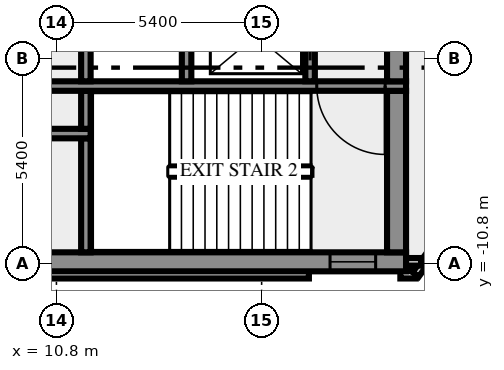
"""IFC4 building model, lengths in metres.
Left out: names, types, materials, properties, quantities, classifications, styles, units other than length and angle.
Written with IfcOpenShell. Run it as: python <this file> out.ifc"""

import sys

from ifc_helpers import new_model, si_unit, direction, frame, frame_2d, origin, place, context, subcontext, project, spatial, rectangle, extrude, element, fill, save


model = new_model("IFC4")
c1 = context("Model", 3, precision=1e-05, world=origin(), true_north=direction((0.0, 1.0)))
c2 = subcontext(c1, "Body", "Model", "MODEL_VIEW")
j1 = project(units=[si_unit("LENGTHUNIT", "METRE"), si_unit("PLANEANGLEUNIT", "RADIAN")], contexts=[c1])
p1 = place(None, origin())
s1 = spatial("IfcSite", under=j1, at=p1, CompositionType="ELEMENT")
p2 = place(p1, origin())
s2 = spatial("IfcBuilding", under=s1, at=p2, CompositionType="ELEMENT")
p3 = place(p2, frame((0.0, 0.0, 335.0)))
s3 = spatial("IfcBuildingStorey", under=s2, at=p3, CompositionType="ELEMENT", Elevation=335.0)
p4 = place(p3, frame((-17.444, -11.088, 0.0), z_axis=(0.0, 0.0, 1.0), x_axis=(1.0, 0.0, 0.0)))
e1 = element("IfcWall", 1, at=p4, inside=s3, PredefinedType="SOLIDWALL", context=c2, shape_type="SweptSolid", body=[
    extrude(rectangle(XDim=34.888, YDim=0.2, at=frame_2d((17.444, 0.0))), origin(), (0.0, 0.0, 1.0), 3.65),
])
p5 = place(p3, frame((19.85, -11.088, 0.0), z_axis=(0.0, 0.0, 1.0), x_axis=(1.0, 0.0, 0.0)))
e2 = element("IfcWall", 2, at=p5, inside=s3, PredefinedType="SOLIDWALL", context=c2, shape_type="SweptSolid", body=[
    extrude(rectangle(XDim=0.406, YDim=0.2, at=frame_2d((0.203, 0.0))), origin(), (0.0, 0.0, 1.0), 3.65),
])
p6 = place(p3, frame((20.253, -11.083, 0.0), z_axis=(0.0, 0.0, 1.0), x_axis=(0.587766567315, 0.809030569476, 0.0)))
e3 = element("IfcWall", 3, at=p6, inside=s3, PredefinedType="SOLIDWALL", context=c2, shape_type="SweptSolid", body=[
    extrude(rectangle(XDim=2.688, YDim=0.2, at=frame_2d((1.344, 0.0))), origin(), (0.0, 0.0, 1.0), 3.65),
])
p7 = place(p3, frame((19.98, -10.75, 0.0), z_axis=(0.0, 0.0, 1.0), x_axis=(1.0, 0.0, 0.0)))
e4 = element("IfcWall", 4, at=p7, inside=s3, PredefinedType="SOLIDWALL", context=c2, shape_type="SweptSolid", body=[
    extrude(rectangle(XDim=0.417, YDim=0.2, at=frame_2d((0.208, 0.0))), origin(), (0.0, 0.0, 1.0), 3.65),
])
p8 = place(p3, frame((-20.0, -10.75, 0.0), z_axis=(0.0, 0.0, 1.0), x_axis=(1.0, 0.0, 0.0)))
e5 = element("IfcWall", 5, at=p8, inside=s3, PredefinedType="SHEAR", context=c2, shape_type="SweptSolid", body=[
    extrude(rectangle(XDim=40.0, YDim=0.5, at=frame_2d((20.0, 0.0))), origin(), (0.0, 0.0, 1.0), 3.65),
])
p9 = place(p8, frame((0.8, 0.0, 1.0)))
e6 = element("IfcOpeningElement", 6, at=p9, cuts=e5, PredefinedType="OPENING", context=c2, shape_type="SweptSolid", body=[
    extrude(rectangle(XDim=1.2, YDim=1.2, at=frame_2d((0.6, 0.6))), frame((0.0, 0.26, 0.0), z_axis=(0.0, -1.0, 0.0), x_axis=(1.0, 0.0, 0.0)), (0.0, 0.0, 1.0), 0.52),
])
p10 = place(p8, frame((38.0, 0.0, 1.0)))
e7 = element("IfcOpeningElement", 7, at=p10, cuts=e5, PredefinedType="OPENING", context=c2, shape_type="SweptSolid", body=[
    extrude(rectangle(XDim=1.2, YDim=1.2, at=frame_2d((0.6, 0.6))), frame((0.0, 0.26, 0.0), z_axis=(0.0, -1.0, 0.0), x_axis=(1.0, 0.0, 0.0)), (0.0, 0.0, 1.0), 0.52),
])
p11 = place(p3, frame((11.575, -10.5, 0.0), z_axis=(0.0, 0.0, 1.0), x_axis=(0.0, 1.0, 0.0)))
e8 = element("IfcWall", 8, at=p11, inside=s3, PredefinedType="SHEAR", context=c2, shape_type="SweptSolid", body=[
    extrude(rectangle(XDim=3.0, YDim=0.25, at=frame_2d((1.5, 0.0))), origin(), (0.0, 0.0, 1.0), 3.65),
])
p12 = place(p3, frame((19.75, -10.5, 0.0), z_axis=(0.0, 0.0, 1.0), x_axis=(0.0, 1.0, 0.0)))
e9 = element("IfcWall", 9, at=p12, inside=s3, PredefinedType="SHEAR", context=c2, shape_type="SweptSolid", body=[
    extrude(rectangle(XDim=4.25, YDim=0.5, at=frame_2d((2.125, 0.0))), origin(), (0.0, 0.0, 1.0), 3.65),
])
p13 = place(p3, frame((11.7, -7.375, 0.0), z_axis=(0.0, 0.0, 1.0), x_axis=(-1.0, 0.0, 0.0)))
e10 = element("IfcWall", 10, at=p13, inside=s3, PredefinedType="SHEAR", context=c2, shape_type="SweptSolid", body=[
    extrude(rectangle(XDim=23.4, YDim=0.25, at=frame_2d((11.7, 0.0))), origin(), (0.0, 0.0, 1.0), 3.65),
])
p14 = place(p13, frame((22.225, 0.0, 0.0)))
e11 = element("IfcOpeningElement", 11, at=p14, cuts=e10, PredefinedType="OPENING", context=c2, shape_type="SweptSolid", body=[
    extrude(rectangle(XDim=0.8, YDim=2.1, at=frame_2d((0.4, 1.05))), frame((0.0, 0.135, 0.0), z_axis=(0.0, -1.0, 0.0), x_axis=(1.0, 0.0, 0.0)), (0.0, 0.0, 1.0), 0.27),
])
p15 = place(p13, frame((20.2, 0.0, 0.0)))
e12 = element("IfcOpeningElement", 12, at=p15, cuts=e10, PredefinedType="OPENING", context=c2, shape_type="SweptSolid", body=[
    extrude(rectangle(XDim=1.1, YDim=2.1, at=frame_2d((0.55, 1.05))), frame((0.0, 0.135, 0.0), z_axis=(0.0, -1.0, 0.0), x_axis=(1.0, 0.0, 0.0)), (0.0, 0.0, 1.0), 0.27),
])
p16 = place(p13, frame((17.7, 0.0, 0.0)))
e13 = element("IfcOpeningElement", 13, at=p16, cuts=e10, PredefinedType="OPENING", context=c2, shape_type="SweptSolid", body=[
    extrude(rectangle(XDim=1.1, YDim=2.1, at=frame_2d((0.55, 1.05))), frame((0.0, 0.135, 0.0), z_axis=(0.0, -1.0, 0.0), x_axis=(1.0, 0.0, 0.0)), (0.0, 0.0, 1.0), 0.27),
])
p17 = place(p13, frame((15.975, 0.0, 0.0)))
e14 = element("IfcOpeningElement", 14, at=p17, cuts=e10, PredefinedType="OPENING", context=c2, shape_type="SweptSolid", body=[
    extrude(rectangle(XDim=0.8, YDim=2.1, at=frame_2d((0.4, 1.05))), frame((0.0, 0.135, 0.0), z_axis=(0.0, -1.0, 0.0), x_axis=(1.0, 0.0, 0.0)), (0.0, 0.0, 1.0), 0.27),
])
p18 = place(p13, frame((14.2, 0.0, 0.0)))
e15 = element("IfcOpeningElement", 15, at=p18, cuts=e10, PredefinedType="OPENING", context=c2, shape_type="SweptSolid", body=[
    extrude(rectangle(XDim=0.9, YDim=2.1, at=frame_2d((0.45, 1.05))), frame((0.0, 0.135, 0.0), z_axis=(0.0, -1.0, 0.0), x_axis=(1.0, 0.0, 0.0)), (0.0, 0.0, 1.0), 0.27),
])
p19 = place(p13, frame((12.35, 0.0, 0.0)))
e16 = element("IfcOpeningElement", 16, at=p19, cuts=e10, PredefinedType="OPENING", context=c2, shape_type="SweptSolid", body=[
    extrude(rectangle(XDim=0.9, YDim=2.1, at=frame_2d((0.45, 1.05))), frame((0.0, 0.135, 0.0), z_axis=(0.0, -1.0, 0.0), x_axis=(1.0, 0.0, 0.0)), (0.0, 0.0, 1.0), 0.27),
])
p20 = place(p13, frame((10.65, 0.0, 0.0)))
e17 = element("IfcOpeningElement", 17, at=p20, cuts=e10, PredefinedType="OPENING", context=c2, shape_type="SweptSolid", body=[
    extrude(rectangle(XDim=0.9, YDim=2.1, at=frame_2d((0.45, 1.05))), frame((0.0, 0.135, 0.0), z_axis=(0.0, -1.0, 0.0), x_axis=(1.0, 0.0, 0.0)), (0.0, 0.0, 1.0), 0.27),
])
p21 = place(p13, frame((7.713, 0.0, 0.0)))
e18 = element("IfcOpeningElement", 18, at=p21, cuts=e10, PredefinedType="OPENING", context=c2, shape_type="SweptSolid", body=[
    extrude(rectangle(XDim=0.9, YDim=2.1, at=frame_2d((0.45, 1.05))), frame((0.0, 0.135, 0.0), z_axis=(0.0, -1.0, 0.0), x_axis=(1.0, 0.0, 0.0)), (0.0, 0.0, 1.0), 0.27),
])
p22 = place(p13, frame((4.15, 0.0, 0.0)))
e19 = element("IfcOpeningElement", 19, at=p22, cuts=e10, PredefinedType="OPENING", context=c2, shape_type="SweptSolid", body=[
    extrude(rectangle(XDim=0.9, YDim=2.1, at=frame_2d((0.45, 1.05))), frame((0.0, 0.135, 0.0), z_axis=(0.0, -1.0, 0.0), x_axis=(1.0, 0.0, 0.0)), (0.0, 0.0, 1.0), 0.27),
])
p23 = place(p13, frame((1.138, 0.0, 0.0)))
e20 = element("IfcOpeningElement", 20, at=p23, cuts=e10, PredefinedType="OPENING", context=c2, shape_type="SweptSolid", body=[
    extrude(rectangle(XDim=0.9, YDim=2.1, at=frame_2d((0.45, 1.05))), frame((0.0, 0.135, 0.0), z_axis=(0.0, -1.0, 0.0), x_axis=(1.0, 0.0, 0.0)), (0.0, 0.0, 1.0), 0.27),
])
p24 = place(p3, frame((11.575, -7.25, 0.0), z_axis=(0.0, 0.0, 1.0), x_axis=(0.0, 1.0, 0.0)))
e21 = element("IfcWall", 21, at=p24, inside=s3, PredefinedType="SHEAR", context=c2, shape_type="SweptSolid", body=[
    extrude(rectangle(XDim=1.0, YDim=0.25, at=frame_2d((0.5, 0.0))), origin(), (0.0, 0.0, 1.0), 3.65),
])
p25 = place(p3, frame((20.0, -6.125, 0.0), z_axis=(0.0, 0.0, 1.0), x_axis=(-1.0, 0.0, 0.0)))
e22 = element("IfcWall", 22, at=p25, inside=s3, PredefinedType="SHEAR", context=c2, shape_type="SweptSolid", body=[
    extrude(rectangle(XDim=10.8, YDim=0.25, at=frame_2d((5.4, 0.0))), origin(), (0.0, 0.0, 1.0), 3.65),
])
p26 = place(p25, frame((0.55, 0.0, 0.0)))
e23 = element("IfcOpeningElement", 23, at=p26, cuts=e22, PredefinedType="OPENING", context=c2, shape_type="SweptSolid", body=[
    extrude(rectangle(XDim=1.8, YDim=2.1, at=frame_2d((0.9, 1.05))), frame((0.0, 0.135, 0.0), z_axis=(0.0, -1.0, 0.0), x_axis=(1.0, 0.0, 0.0)), (0.0, 0.0, 1.0), 0.27),
])
p27 = place(p3, frame((11.575, -6.0, 0.0), z_axis=(0.0, 0.0, 1.0), x_axis=(0.0, 1.0, 0.0)))
e24 = element("IfcWall", 24, at=p27, inside=s3, PredefinedType="SHEAR", context=c2, shape_type="SweptSolid", body=[
    extrude(rectangle(XDim=1.75, YDim=0.25, at=frame_2d((0.875, 0.0))), origin(), (0.0, 0.0, 1.0), 3.65),
])
p28 = place(p3, frame((14.225, -6.0, 0.0), z_axis=(0.0, 0.0, 1.0), x_axis=(0.0, 1.0, 0.0)))
e25 = element("IfcWall", 25, at=p28, inside=s3, PredefinedType="SHEAR", context=c2, shape_type="SweptSolid", body=[
    extrude(rectangle(XDim=4.3, YDim=0.25, at=frame_2d((2.15, 0.0))), origin(), (0.0, 0.0, 1.0), 3.65),
])
p29 = place(p3, frame((17.475, -6.0, 0.0), z_axis=(0.0, 0.0, 1.0), x_axis=(0.0, 1.0, 0.0)))
e26 = element("IfcWall", 26, at=p29, inside=s3, PredefinedType="SHEAR", context=c2, shape_type="SweptSolid", body=[
    extrude(rectangle(XDim=4.3, YDim=0.25, at=frame_2d((2.15, 0.0))), origin(), (0.0, 0.0, 1.0), 3.65),
])
p30 = place(p29, frame((0.55, 0.0, 0.0)))
e27 = element("IfcOpeningElement", 27, at=p30, cuts=e26, PredefinedType="OPENING", context=c2, shape_type="SweptSolid", body=[
    extrude(rectangle(XDim=1.3, YDim=2.1, at=frame_2d((0.65, 1.05))), frame((0.0, 0.135, 0.0), z_axis=(0.0, -1.0, 0.0), x_axis=(1.0, 0.0, 0.0)), (0.0, 0.0, 1.0), 0.27),
])
p31 = place(p3, frame((19.75, -6.0, 0.0), z_axis=(0.0, 0.0, 1.0), x_axis=(0.0, 1.0, 0.0)))
e28 = element("IfcWall", 28, at=p31, inside=s3, PredefinedType="SHEAR", context=c2, shape_type="SweptSolid", body=[
    extrude(rectangle(XDim=4.3, YDim=0.5, at=frame_2d((2.15, 0.0))), origin(), (0.0, 0.0, 1.0), 3.65),
])
p32 = place(p10, origin())
e29 = element("IfcWindow", 29, at=p32, inside=s3, PartitioningType="SINGLE_PANEL", PredefinedType="WINDOW", context=c2, shape_type="SweptSolid", body=[
    extrude(rectangle(XDim=1.2, YDim=1.2, at=frame_2d((0.6, 0.6))), frame((0.0, 0.03, 0.0), z_axis=(0.0, -1.0, 0.0), x_axis=(1.0, 0.0, 0.0)), (0.0, 0.0, 1.0), 0.06),
])
fill(e7, e29)
p33 = place(p26, origin())
e30 = element("IfcDoor", 30, at=p33, inside=s3, OperationType="DOUBLE_DOOR_SINGLE_SWING", PredefinedType="DOOR", context=c2, shape_type="SweptSolid", body=[
    extrude(rectangle(XDim=1.8, YDim=2.1, at=frame_2d((0.9, 1.05))), frame((0.0, 0.025, 0.0), z_axis=(0.0, -1.0, 0.0), x_axis=(1.0, 0.0, 0.0)), (0.0, 0.0, 1.0), 0.05),
])
fill(e23, e30)
p34 = place(p30, origin())
e31 = element("IfcDoor", 31, at=p34, inside=s3, OperationType="DOUBLE_DOOR_SLIDING", PredefinedType="DOOR", context=c2, shape_type="SweptSolid", body=[
    extrude(rectangle(XDim=1.3, YDim=2.1, at=frame_2d((0.65, 1.05))), frame((0.0, 0.025, 0.0), z_axis=(0.0, -1.0, 0.0), x_axis=(1.0, 0.0, 0.0)), (0.0, 0.0, 1.0), 0.05),
])
fill(e27, e31)
save(model, sys.argv[1])
